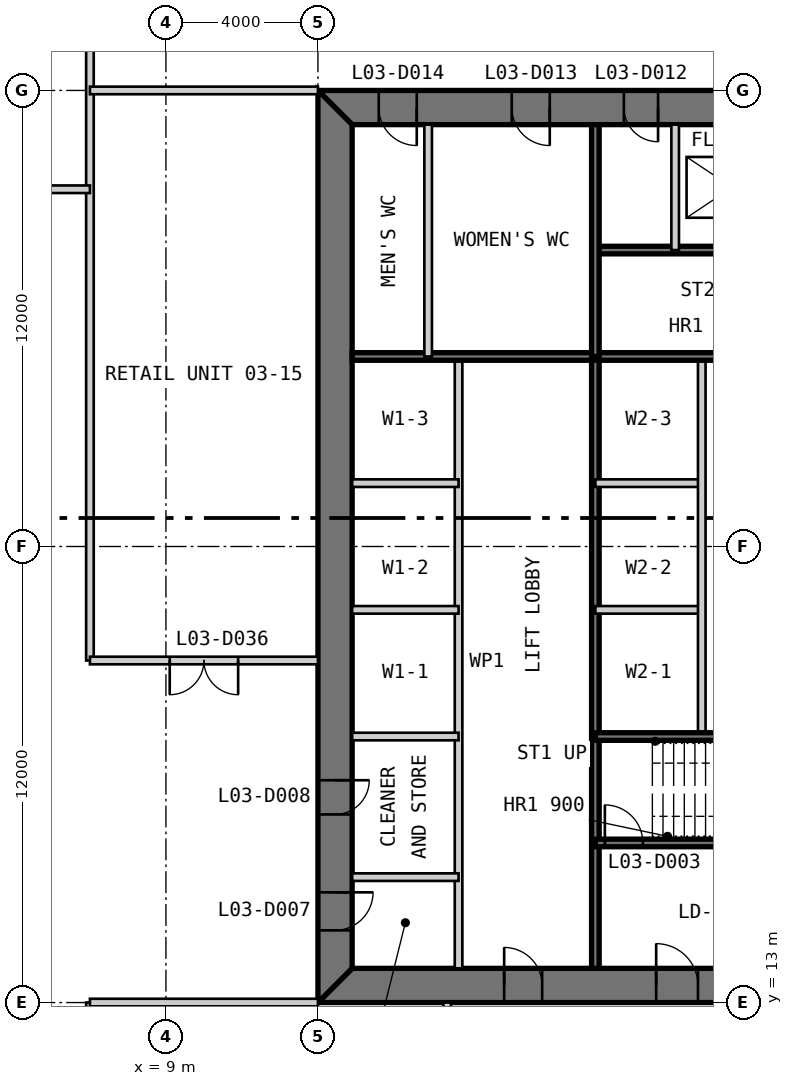
"""IFC4 building model, lengths in metres.
Left out: names, types, materials, properties, quantities, classifications, styles, units other than length and angle.
Written with IfcOpenShell. Run it as: python <this file> out.ifc"""

import sys

from ifc_helpers import new_model, si_unit, direction, frame, frame_2d, origin, place, context, subcontext, project, spatial, polyline, rectangle, outline, extrude, element, fill, save


model = new_model("IFC4")
c1 = context("Model", 3, precision=1e-05, world=origin(), true_north=direction((0.0, 1.0)))
c2 = subcontext(c1, "Body", "Model", "MODEL_VIEW")
j1 = project(units=[si_unit("LENGTHUNIT", "METRE"), si_unit("PLANEANGLEUNIT", "RADIAN")], contexts=[c1])
p1 = place(None, origin())
s1 = spatial("IfcSite", under=j1, at=p1, CompositionType="ELEMENT")
p2 = place(p1, origin())
s2 = spatial("IfcBuilding", under=s1, at=p2, CompositionType="ELEMENT")
p3 = place(p2, frame((0.0, 0.0, 16.6)))
s3 = spatial("IfcBuildingStorey", under=s2, at=p3, CompositionType="ELEMENT", Elevation=16.6)
p4 = place(p3, frame((13.0, 13.45, 0.0), z_axis=(0.0, 0.0, 1.0), x_axis=(1.0, 0.0, 0.0)))
e1 = element("IfcWall", 1, at=p4, inside=s3, PredefinedType="SHEAR", context=c2, shape_type="SweptSolid", body=[
    extrude(outline(polyline([(0.0, -0.45), (24.0, -0.45), (23.1, 0.45), (0.9, 0.45), (0.0, -0.45)])), origin(), (0.0, 0.0, 1.0), 4.8),
])
p5 = place(p4, frame((4.9, 0.0, 0.0)))
e2 = element("IfcOpeningElement", 2, at=p5, cuts=e1, PredefinedType="OPENING", context=c2, shape_type="SweptSolid", body=[
    extrude(rectangle(XDim=1.0, YDim=2.2, at=frame_2d((0.5, 1.1))), frame((0.0, 0.46, 0.0), z_axis=(0.0, -1.0, 0.0), x_axis=(1.0, 0.0, 0.0)), (0.0, 0.0, 1.0), 0.92),
])
p6 = place(p4, frame((8.9, 0.0, 0.0)))
e3 = element("IfcOpeningElement", 3, at=p6, cuts=e1, PredefinedType="OPENING", context=c2, shape_type="SweptSolid", body=[
    extrude(rectangle(XDim=1.1, YDim=2.2, at=frame_2d((0.55, 1.1))), frame((0.0, 0.46, 0.0), z_axis=(0.0, -1.0, 0.0), x_axis=(1.0, 0.0, 0.0)), (0.0, 0.0, 1.0), 0.92),
])
p7 = place(p4, frame((15.05, 0.0, 0.0)))
e4 = element("IfcOpeningElement", 4, at=p7, cuts=e1, PredefinedType="OPENING", context=c2, shape_type="SweptSolid", body=[
    extrude(rectangle(XDim=0.9, YDim=2.2, at=frame_2d((0.45, 1.1))), frame((0.0, 0.46, 0.0), z_axis=(0.0, -1.0, 0.0), x_axis=(1.0, 0.0, 0.0)), (0.0, 0.0, 1.0), 0.92),
])
p8 = place(p4, frame((17.9, 0.0, 0.0)))
e5 = element("IfcOpeningElement", 5, at=p8, cuts=e1, PredefinedType="OPENING", context=c2, shape_type="SweptSolid", body=[
    extrude(rectangle(XDim=1.0, YDim=2.2, at=frame_2d((0.5, 1.1))), frame((0.0, 0.46, 0.0), z_axis=(0.0, -1.0, 0.0), x_axis=(1.0, 0.0, 0.0)), (0.0, 0.0, 1.0), 0.92),
])
p9 = place(p4, frame((21.4, 0.0, 0.0)))
e6 = element("IfcOpeningElement", 6, at=p9, cuts=e1, PredefinedType="OPENING", context=c2, shape_type="SweptSolid", body=[
    extrude(rectangle(XDim=1.0, YDim=2.2, at=frame_2d((0.5, 1.1))), frame((0.0, 0.46, 0.0), z_axis=(0.0, -1.0, 0.0), x_axis=(1.0, 0.0, 0.0)), (0.0, 0.0, 1.0), 0.92),
])
p10 = place(p3, frame((37.0, 36.55, 0.0), z_axis=(0.0, 0.0, 1.0), x_axis=(-1.0, 0.0, 0.0)))
e7 = element("IfcWall", 7, at=p10, inside=s3, PredefinedType="SHEAR", context=c2, shape_type="SweptSolid", body=[
    extrude(outline(polyline([(0.0, -0.45), (24.0, -0.45), (23.1, 0.45), (0.9, 0.45), (0.0, -0.45)])), origin(), (0.0, 0.0, 1.0), 4.8),
])
p11 = place(p10, frame((4.9, 0.0, 0.0)))
e8 = element("IfcOpeningElement", 8, at=p11, cuts=e7, PredefinedType="OPENING", context=c2, shape_type="SweptSolid", body=[
    extrude(rectangle(XDim=1.0, YDim=2.2, at=frame_2d((0.5, 1.1))), frame((0.0, 0.46, 0.0), z_axis=(0.0, -1.0, 0.0), x_axis=(1.0, 0.0, 0.0)), (0.0, 0.0, 1.0), 0.92),
])
p12 = place(p10, frame((8.9, 0.0, 0.0)))
e9 = element("IfcOpeningElement", 9, at=p12, cuts=e7, PredefinedType="OPENING", context=c2, shape_type="SweptSolid", body=[
    extrude(rectangle(XDim=1.1, YDim=2.2, at=frame_2d((0.55, 1.1))), frame((0.0, 0.46, 0.0), z_axis=(0.0, -1.0, 0.0), x_axis=(1.0, 0.0, 0.0)), (0.0, 0.0, 1.0), 0.92),
])
p13 = place(p10, frame((15.05, 0.0, 0.0)))
e10 = element("IfcOpeningElement", 10, at=p13, cuts=e7, PredefinedType="OPENING", context=c2, shape_type="SweptSolid", body=[
    extrude(rectangle(XDim=0.9, YDim=2.2, at=frame_2d((0.45, 1.1))), frame((0.0, 0.46, 0.0), z_axis=(0.0, -1.0, 0.0), x_axis=(1.0, 0.0, 0.0)), (0.0, 0.0, 1.0), 0.92),
])
p14 = place(p10, frame((17.9, 0.0, 0.0)))
e11 = element("IfcOpeningElement", 11, at=p14, cuts=e7, PredefinedType="OPENING", context=c2, shape_type="SweptSolid", body=[
    extrude(rectangle(XDim=1.0, YDim=2.2, at=frame_2d((0.5, 1.1))), frame((0.0, 0.46, 0.0), z_axis=(0.0, -1.0, 0.0), x_axis=(1.0, 0.0, 0.0)), (0.0, 0.0, 1.0), 0.92),
])
p15 = place(p10, frame((21.4, 0.0, 0.0)))
e12 = element("IfcOpeningElement", 12, at=p15, cuts=e7, PredefinedType="OPENING", context=c2, shape_type="SweptSolid", body=[
    extrude(rectangle(XDim=1.0, YDim=2.2, at=frame_2d((0.5, 1.1))), frame((0.0, 0.46, 0.0), z_axis=(0.0, -1.0, 0.0), x_axis=(1.0, 0.0, 0.0)), (0.0, 0.0, 1.0), 0.92),
])
p16 = place(p3, frame((13.45, 36.1, 0.0), z_axis=(0.0, 0.0, 1.0), x_axis=(0.0, -1.0, 0.0)))
e13 = element("IfcWall", 13, at=p16, inside=s3, PredefinedType="SHEAR", context=c2, shape_type="SweptSolid", body=[
    extrude(outline(polyline([(-0.9, -0.45), (23.1, -0.45), (22.2, 0.45), (0.0, 0.45), (-0.9, -0.45)])), origin(), (0.0, 0.0, 1.0), 4.8),
])
p17 = place(p16, frame((20.2, 0.0, 0.0)))
e14 = element("IfcOpeningElement", 14, at=p17, cuts=e13, PredefinedType="OPENING", context=c2, shape_type="SweptSolid", body=[
    extrude(rectangle(XDim=1.0, YDim=2.2, at=frame_2d((0.5, 1.1))), frame((0.0, 0.46, 0.0), z_axis=(0.0, -1.0, 0.0), x_axis=(1.0, 0.0, 0.0)), (0.0, 0.0, 1.0), 0.92),
])
p18 = place(p16, frame((17.25, 0.0, 0.0)))
e15 = element("IfcOpeningElement", 15, at=p18, cuts=e13, PredefinedType="OPENING", context=c2, shape_type="SweptSolid", body=[
    extrude(rectangle(XDim=0.9, YDim=2.2, at=frame_2d((0.45, 1.1))), frame((0.0, 0.46, 0.0), z_axis=(0.0, -1.0, 0.0), x_axis=(1.0, 0.0, 0.0)), (0.0, 0.0, 1.0), 0.92),
])
p19 = place(p3, frame((16.7, 13.9, 0.0), z_axis=(0.0, 0.0, 1.0), x_axis=(0.0, 1.0, 0.0)))
e16 = element("IfcWall", 16, at=p19, inside=s3, PredefinedType="PARTITIONING", context=c2, shape_type="SweptSolid", body=[
    extrude(rectangle(XDim=16.1, YDim=0.2, at=frame_2d((8.05, 0.0))), origin(), (0.0, 0.0, 1.0), 4.6),
])
p20 = place(p3, frame((20.3, 13.9, 0.0), z_axis=(0.0, 0.0, 1.0), x_axis=(0.0, 1.0, 0.0)))
e17 = element("IfcWall", 17, at=p20, inside=s3, PredefinedType="SOLIDWALL", context=c2, shape_type="SweptSolid", body=[
    extrude(rectangle(XDim=16.1, YDim=0.2, at=frame_2d((8.05, 0.0))), origin(), (0.0, 0.0, 1.0), 4.6),
])
for number, where, z_axis, x_axis in (
    (18, (13.9, 20.0, 0.0), (0.0, 0.0, 1.0), (1.0, 0.0, 0.0)),
    (19, (13.9, 23.333, 0.0), (0.0, 0.0, 1.0), (1.0, 0.0, 0.0)),
    (20, (13.9, 26.667, 0.0), (0.0, 0.0, 1.0), (1.0, 0.0, 0.0)),
    (21, (20.3, 23.333, 0.0), (0.0, 0.0, 1.0), (1.0, 0.0, 0.0)),
    (22, (20.3, 26.667, 0.0), (0.0, 0.0, 1.0), (1.0, 0.0, 0.0)),
):
    element("IfcWall", number, at=place(p3, frame(where, z_axis=z_axis, x_axis=x_axis)), inside=s3, PredefinedType="PARTITIONING", context=c2, shape_type="SweptSolid", body=[
        extrude(rectangle(XDim=2.8, YDim=0.2, at=frame_2d((1.4, 0.0))), origin(), (0.0, 0.0, 1.0), 4.6),
    ])
p21 = place(p3, frame((23.1, 20.0, 0.0), z_axis=(0.0, 0.0, 1.0), x_axis=(0.0, 1.0, 0.0)))
e23 = element("IfcWall", 23, at=p21, inside=s3, PredefinedType="PARTITIONING", context=c2, shape_type="SweptSolid", body=[
    extrude(rectangle(XDim=10.0, YDim=0.2, at=frame_2d((5.0, 0.0))), origin(), (0.0, 0.0, 1.0), 4.6),
])
p22 = place(p3, frame((20.3, 17.2, 0.0), z_axis=(0.0, 0.0, 1.0), x_axis=(1.0, 0.0, 0.0)))
e24 = element("IfcWall", 24, at=p22, inside=s3, PredefinedType="SOLIDWALL", context=c2, shape_type="SweptSolid", body=[
    extrude(rectangle(XDim=9.4, YDim=0.2, at=frame_2d((4.7, 0.0))), origin(), (0.0, 0.0, 1.0), 4.6),
])
p23 = place(p22, frame((0.25, 0.0, 0.0)))
e25 = element("IfcOpeningElement", 25, at=p23, cuts=e24, PredefinedType="OPENING", context=c2, shape_type="SweptSolid", body=[
    extrude(rectangle(XDim=1.0, YDim=2.2, at=frame_2d((0.5, 1.1))), frame((0.0, 0.11, 0.0), z_axis=(0.0, -1.0, 0.0), x_axis=(1.0, 0.0, 0.0)), (0.0, 0.0, 1.0), 0.22),
])
p24 = place(p3, frame((20.3, 20.0, 0.0), z_axis=(0.0, 0.0, 1.0), x_axis=(1.0, 0.0, 0.0)))
e26 = element("IfcWall", 26, at=p24, inside=s3, PredefinedType="SOLIDWALL", context=c2, shape_type="SweptSolid", body=[
    extrude(rectangle(XDim=15.8, YDim=0.2, at=frame_2d((7.9, 0.0))), origin(), (0.0, 0.0, 1.0), 4.6),
])
p25 = place(p3, frame((13.9, 16.3, 0.0), z_axis=(0.0, 0.0, 1.0), x_axis=(1.0, 0.0, 0.0)))
e27 = element("IfcWall", 27, at=p25, inside=s3, PredefinedType="PARTITIONING", context=c2, shape_type="SweptSolid", body=[
    extrude(rectangle(XDim=2.8, YDim=0.2, at=frame_2d((1.4, 0.0))), origin(), (0.0, 0.0, 1.0), 4.6),
])
p26 = place(p3, frame((29.7, 32.8, 0.0), z_axis=(0.0, 0.0, 1.0), x_axis=(-1.0, 0.0, 0.0)))
e28 = element("IfcWall", 28, at=p26, inside=s3, PredefinedType="SOLIDWALL", context=c2, shape_type="SweptSolid", body=[
    extrude(rectangle(XDim=9.4, YDim=0.2, at=frame_2d((4.7, 0.0))), origin(), (0.0, 0.0, 1.0), 4.6),
])
p27 = place(p26, frame((0.25, 0.0, 0.0)))
e29 = element("IfcOpeningElement", 29, at=p27, cuts=e28, PredefinedType="OPENING", context=c2, shape_type="SweptSolid", body=[
    extrude(rectangle(XDim=1.0, YDim=2.2, at=frame_2d((0.5, 1.1))), frame((0.0, 0.11, 0.0), z_axis=(0.0, -1.0, 0.0), x_axis=(1.0, 0.0, 0.0)), (0.0, 0.0, 1.0), 0.22),
])
p28 = place(p3, frame((29.7, 30.0, 0.0), z_axis=(0.0, 0.0, 1.0), x_axis=(-1.0, 0.0, 0.0)))
e30 = element("IfcWall", 30, at=p28, inside=s3, PredefinedType="SOLIDWALL", context=c2, shape_type="SweptSolid", body=[
    extrude(rectangle(XDim=15.8, YDim=0.2, at=frame_2d((7.9, 0.0))), origin(), (0.0, 0.0, 1.0), 4.6),
])
p29 = place(p3, frame((22.4, 36.1, 0.0), z_axis=(0.0, 0.0, 1.0), x_axis=(0.0, -1.0, 0.0)))
e31 = element("IfcWall", 31, at=p29, inside=s3, PredefinedType="PARTITIONING", context=c2, shape_type="SweptSolid", body=[
    extrude(rectangle(XDim=3.3, YDim=0.2, at=frame_2d((1.65, 0.0))), origin(), (0.0, 0.0, 1.0), 4.6),
])
p30 = place(p3, frame((20.3, 36.1, 0.0), z_axis=(0.0, 0.0, 1.0), x_axis=(0.0, -1.0, 0.0)))
e32 = element("IfcWall", 32, at=p30, inside=s3, PredefinedType="SOLIDWALL", context=c2, shape_type="SweptSolid", body=[
    extrude(rectangle(XDim=6.1, YDim=0.2, at=frame_2d((3.05, 0.0))), origin(), (0.0, 0.0, 1.0), 4.6),
])
p31 = place(p3, frame((15.9, 36.1, 0.0), z_axis=(0.0, 0.0, 1.0), x_axis=(0.0, -1.0, 0.0)))
e33 = element("IfcWall", 33, at=p31, inside=s3, PredefinedType="PARTITIONING", context=c2, shape_type="SweptSolid", body=[
    extrude(rectangle(XDim=6.1, YDim=0.2, at=frame_2d((3.05, 0.0))), origin(), (0.0, 0.0, 1.0), 4.6),
])
p32 = place(p3, frame((7.0, 7.0, 0.0), z_axis=(0.0, 0.0, 1.0), x_axis=(0.0, 1.0, 0.0)))
e34 = element("IfcWall", 34, at=p32, inside=s3, PredefinedType="PARTITIONING", context=c2, shape_type="SweptSolid", body=[
    extrude(rectangle(XDim=6.0, YDim=0.2, at=frame_2d((3.0, 0.0))), origin(), (0.0, 0.0, 1.0), 4.5),
])
p33 = place(p3, frame((7.0, 22.0, 0.0), z_axis=(0.0, 0.0, 1.0), x_axis=(0.0, 1.0, 0.0)))
e35 = element("IfcWall", 35, at=p33, inside=s3, PredefinedType="PARTITIONING", context=c2, shape_type="SweptSolid", body=[
    extrude(rectangle(XDim=21.0, YDim=0.2, at=frame_2d((10.5, 0.0))), origin(), (0.0, 0.0, 1.0), 3.843),
])
p34 = place(p3, frame((16.4, 7.0, 0.0), z_axis=(0.0, 0.0, 1.0), x_axis=(0.0, 1.0, 0.0)))
e36 = element("IfcWall", 36, at=p34, inside=s3, PredefinedType="PARTITIONING", context=c2, shape_type="SweptSolid", body=[
    extrude(rectangle(XDim=6.0, YDim=0.2, at=frame_2d((3.0, 0.0))), origin(), (0.0, 0.0, 1.0), 4.5),
])
p35 = place(p3, frame((7.0, 13.0, 0.0), z_axis=(0.0, 0.0, 1.0), x_axis=(1.0, 0.0, 0.0)))
e37 = element("IfcWall", 37, at=p35, inside=s3, PredefinedType="PARTITIONING", context=c2, shape_type="SweptSolid", body=[
    extrude(rectangle(XDim=6.0, YDim=0.2, at=frame_2d((3.0, 0.0))), origin(), (0.0, 0.0, 1.0), 3.653),
])
p36 = place(p3, frame((7.0, 22.0, 0.0), z_axis=(0.0, 0.0, 1.0), x_axis=(1.0, 0.0, 0.0)))
e38 = element("IfcWall", 38, at=p36, inside=s3, PredefinedType="PARTITIONING", context=c2, shape_type="SweptSolid", body=[
    extrude(rectangle(XDim=6.0, YDim=0.2, at=frame_2d((3.0, 0.0))), origin(), (0.0, 0.0, 1.0), 4.5),
])
p37 = place(p36, frame((2.1, 0.0, 0.0)))
e39 = element("IfcOpeningElement", 39, at=p37, cuts=e38, PredefinedType="OPENING", context=c2, shape_type="SweptSolid", body=[
    extrude(rectangle(XDim=1.8, YDim=2.4, at=frame_2d((0.9, 1.2))), frame((0.0, 0.11, 0.0), z_axis=(0.0, -1.0, 0.0), x_axis=(1.0, 0.0, 0.0)), (0.0, 0.0, 1.0), 0.22),
])
p38 = place(p3, frame((-15.25, 34.4, 0.0), z_axis=(0.0, 0.0, 1.0), x_axis=(1.0, 0.0, 0.0)))
e40 = element("IfcWall", 40, at=p38, inside=s3, PredefinedType="PARTITIONING", context=c2, shape_type="SweptSolid", body=[
    extrude(rectangle(XDim=22.25, YDim=0.2, at=frame_2d((11.125, 0.0))), origin(), (0.0, 0.0, 1.0), 4.5),
])
p39 = place(p38, frame((17.525, 0.0, 0.0)))
e41 = element("IfcOpeningElement", 41, at=p39, cuts=e40, PredefinedType="OPENING", context=c2, shape_type="SweptSolid", body=[
    extrude(rectangle(XDim=1.8, YDim=2.4, at=frame_2d((0.9, 1.2))), frame((0.0, 0.11, 0.0), z_axis=(0.0, -1.0, 0.0), x_axis=(1.0, 0.0, 0.0)), (0.0, 0.0, 1.0), 0.22),
])
p40 = place(p38, frame((10.325, 0.0, 0.0)))
e42 = element("IfcOpeningElement", 42, at=p40, cuts=e40, PredefinedType="OPENING", context=c2, shape_type="SweptSolid", body=[
    extrude(rectangle(XDim=1.8, YDim=2.4, at=frame_2d((0.9, 1.2))), frame((0.0, 0.11, 0.0), z_axis=(0.0, -1.0, 0.0), x_axis=(1.0, 0.0, 0.0)), (0.0, 0.0, 1.0), 0.22),
])
p41 = place(p38, frame((3.025, 0.0, 0.0)))
e43 = element("IfcOpeningElement", 43, at=p41, cuts=e40, PredefinedType="OPENING", context=c2, shape_type="SweptSolid", body=[
    extrude(rectangle(XDim=1.8, YDim=2.4, at=frame_2d((0.9, 1.2))), frame((0.0, 0.11, 0.0), z_axis=(0.0, -1.0, 0.0), x_axis=(1.0, 0.0, 0.0)), (0.0, 0.0, 1.0), 0.22),
])
p42 = place(p3, frame((7.0, 37.0, 0.0), z_axis=(0.0, 0.0, 1.0), x_axis=(1.0, 0.0, 0.0)))
e44 = element("IfcWall", 44, at=p42, inside=s3, PredefinedType="PARTITIONING", context=c2, shape_type="SweptSolid", body=[
    extrude(rectangle(XDim=6.0, YDim=0.2, at=frame_2d((3.0, 0.0))), origin(), (0.0, 0.0, 1.0), 3.653),
])
p43 = place(p5, origin())
e45 = element("IfcDoor", 45, at=p43, inside=s3, OperationType="SINGLE_SWING_LEFT", PredefinedType="DOOR", context=c2, shape_type="SweptSolid", body=[
    extrude(rectangle(XDim=1.0, YDim=2.2, at=frame_2d((0.5, 1.1))), frame((0.0, 0.025, 0.0), z_axis=(0.0, -1.0, 0.0), x_axis=(1.0, 0.0, 0.0)), (0.0, 0.0, 1.0), 0.05),
    extrude(outline(polyline([(0.0, 0.0), (0.04, 0.0), (0.04, 2.16), (0.96, 2.16), (0.96, 0.0), (1.0, 0.0), (1.0, 2.2), (0.0, 2.2), (0.0, 0.0)])), frame((0.0, 0.3, 0.0), z_axis=(0.0, -1.0, 0.0), x_axis=(1.0, 0.0, 0.0)), (0.0, 0.0, 1.0), 0.6),
])
fill(e2, e45)
p44 = place(p6, origin())
e46 = element("IfcDoor", 46, at=p44, inside=s3, OperationType="SINGLE_SWING_LEFT", PredefinedType="DOOR", context=c2, shape_type="SweptSolid", body=[
    extrude(rectangle(XDim=1.1, YDim=2.2, at=frame_2d((0.55, 1.1))), frame((0.0, 0.025, 0.0), z_axis=(0.0, -1.0, 0.0), x_axis=(1.0, 0.0, 0.0)), (0.0, 0.0, 1.0), 0.05),
    extrude(outline(polyline([(0.0, 0.0), (0.04, 0.0), (0.04, 2.16), (1.06, 2.16), (1.06, 0.0), (1.1, 0.0), (1.1, 2.2), (0.0, 2.2), (0.0, 0.0)])), frame((0.0, 0.3, 0.0), z_axis=(0.0, -1.0, 0.0), x_axis=(1.0, 0.0, 0.0)), (0.0, 0.0, 1.0), 0.6),
])
fill(e3, e46)
p45 = place(p23, origin())
e47 = element("IfcDoor", 47, at=p45, inside=s3, OperationType="SINGLE_SWING_LEFT", PredefinedType="DOOR", context=c2, shape_type="SweptSolid", body=[
    extrude(rectangle(XDim=1.0, YDim=2.2, at=frame_2d((0.5, 1.1))), frame((0.0, 0.025, 0.0), z_axis=(0.0, -1.0, 0.0), x_axis=(1.0, 0.0, 0.0)), (0.0, 0.0, 1.0), 0.05),
])
fill(e25, e47)
p46 = place(p17, origin())
e48 = element("IfcDoor", 48, at=p46, inside=s3, OperationType="SINGLE_SWING_LEFT", PredefinedType="DOOR", context=c2, shape_type="SweptSolid", body=[
    extrude(rectangle(XDim=1.0, YDim=2.2, at=frame_2d((0.5, 1.1))), frame((0.0, 0.025, 0.0), z_axis=(0.0, -1.0, 0.0), x_axis=(1.0, 0.0, 0.0)), (0.0, 0.0, 1.0), 0.05),
    extrude(outline(polyline([(0.0, 0.0), (0.04, 0.0), (0.04, 2.16), (0.96, 2.16), (0.96, 0.0), (1.0, 0.0), (1.0, 2.2), (0.0, 2.2), (0.0, 0.0)])), frame((0.0, 0.3, 0.0), z_axis=(0.0, -1.0, 0.0), x_axis=(1.0, 0.0, 0.0)), (0.0, 0.0, 1.0), 0.6),
])
fill(e14, e48)
p47 = place(p18, origin())
e49 = element("IfcDoor", 49, at=p47, inside=s3, OperationType="SINGLE_SWING_LEFT", PredefinedType="DOOR", context=c2, shape_type="SweptSolid", body=[
    extrude(rectangle(XDim=0.9, YDim=2.2, at=frame_2d((0.45, 1.1))), frame((0.0, 0.025, 0.0), z_axis=(0.0, -1.0, 0.0), x_axis=(1.0, 0.0, 0.0)), (0.0, 0.0, 1.0), 0.05),
    extrude(outline(polyline([(0.0, 0.0), (0.04, 0.0), (0.04, 2.16), (0.86, 2.16), (0.86, 0.0), (0.9, 0.0), (0.9, 2.2), (0.0, 2.2), (0.0, 0.0)])), frame((0.0, 0.3, 0.0), z_axis=(0.0, -1.0, 0.0), x_axis=(1.0, 0.0, 0.0)), (0.0, 0.0, 1.0), 0.6),
])
fill(e15, e49)
p48 = place(p13, origin())
e50 = element("IfcDoor", 50, at=p48, inside=s3, OperationType="SINGLE_SWING_LEFT", PredefinedType="DOOR", context=c2, shape_type="SweptSolid", body=[
    extrude(rectangle(XDim=0.9, YDim=2.2, at=frame_2d((0.45, 1.1))), frame((0.0, 0.025, 0.0), z_axis=(0.0, -1.0, 0.0), x_axis=(1.0, 0.0, 0.0)), (0.0, 0.0, 1.0), 0.05),
    extrude(outline(polyline([(0.0, 0.0), (0.04, 0.0), (0.04, 2.16), (0.86, 2.16), (0.86, 0.0), (0.9, 0.0), (0.9, 2.2), (0.0, 2.2), (0.0, 0.0)])), frame((0.0, 0.3, 0.0), z_axis=(0.0, -1.0, 0.0), x_axis=(1.0, 0.0, 0.0)), (0.0, 0.0, 1.0), 0.6),
])
fill(e10, e50)
p49 = place(p14, origin())
e51 = element("IfcDoor", 51, at=p49, inside=s3, OperationType="SINGLE_SWING_LEFT", PredefinedType="DOOR", context=c2, shape_type="SweptSolid", body=[
    extrude(rectangle(XDim=1.0, YDim=2.2, at=frame_2d((0.5, 1.1))), frame((0.0, 0.025, 0.0), z_axis=(0.0, -1.0, 0.0), x_axis=(1.0, 0.0, 0.0)), (0.0, 0.0, 1.0), 0.05),
    extrude(outline(polyline([(0.0, 0.0), (0.04, 0.0), (0.04, 2.16), (0.96, 2.16), (0.96, 0.0), (1.0, 0.0), (1.0, 2.2), (0.0, 2.2), (0.0, 0.0)])), frame((0.0, 0.3, 0.0), z_axis=(0.0, -1.0, 0.0), x_axis=(1.0, 0.0, 0.0)), (0.0, 0.0, 1.0), 0.6),
])
fill(e11, e51)
p50 = place(p15, origin())
e52 = element("IfcDoor", 52, at=p50, inside=s3, OperationType="SINGLE_SWING_LEFT", PredefinedType="DOOR", context=c2, shape_type="SweptSolid", body=[
    extrude(rectangle(XDim=1.0, YDim=2.2, at=frame_2d((0.5, 1.1))), frame((0.0, 0.025, 0.0), z_axis=(0.0, -1.0, 0.0), x_axis=(1.0, 0.0, 0.0)), (0.0, 0.0, 1.0), 0.05),
    extrude(outline(polyline([(0.0, 0.0), (0.04, 0.0), (0.04, 2.16), (0.96, 2.16), (0.96, 0.0), (1.0, 0.0), (1.0, 2.2), (0.0, 2.2), (0.0, 0.0)])), frame((0.0, 0.3, 0.0), z_axis=(0.0, -1.0, 0.0), x_axis=(1.0, 0.0, 0.0)), (0.0, 0.0, 1.0), 0.6),
])
fill(e12, e52)
p51 = place(p37, frame((1.8, 0.0, 0.0), z_axis=(0.0, 0.0, 1.0), x_axis=(-1.0, 0.0, 0.0)))
e53 = element("IfcDoor", 53, at=p51, inside=s3, OperationType="DOUBLE_DOOR_SINGLE_SWING", PredefinedType="DOOR", context=c2, shape_type="SweptSolid", body=[
    extrude(rectangle(XDim=1.8, YDim=2.4, at=frame_2d((0.9, 1.2))), frame((0.0, 0.025, 0.0), z_axis=(0.0, -1.0, 0.0), x_axis=(1.0, 0.0, 0.0)), (0.0, 0.0, 1.0), 0.05),
])
fill(e39, e53)
save(model, sys.argv[1])
